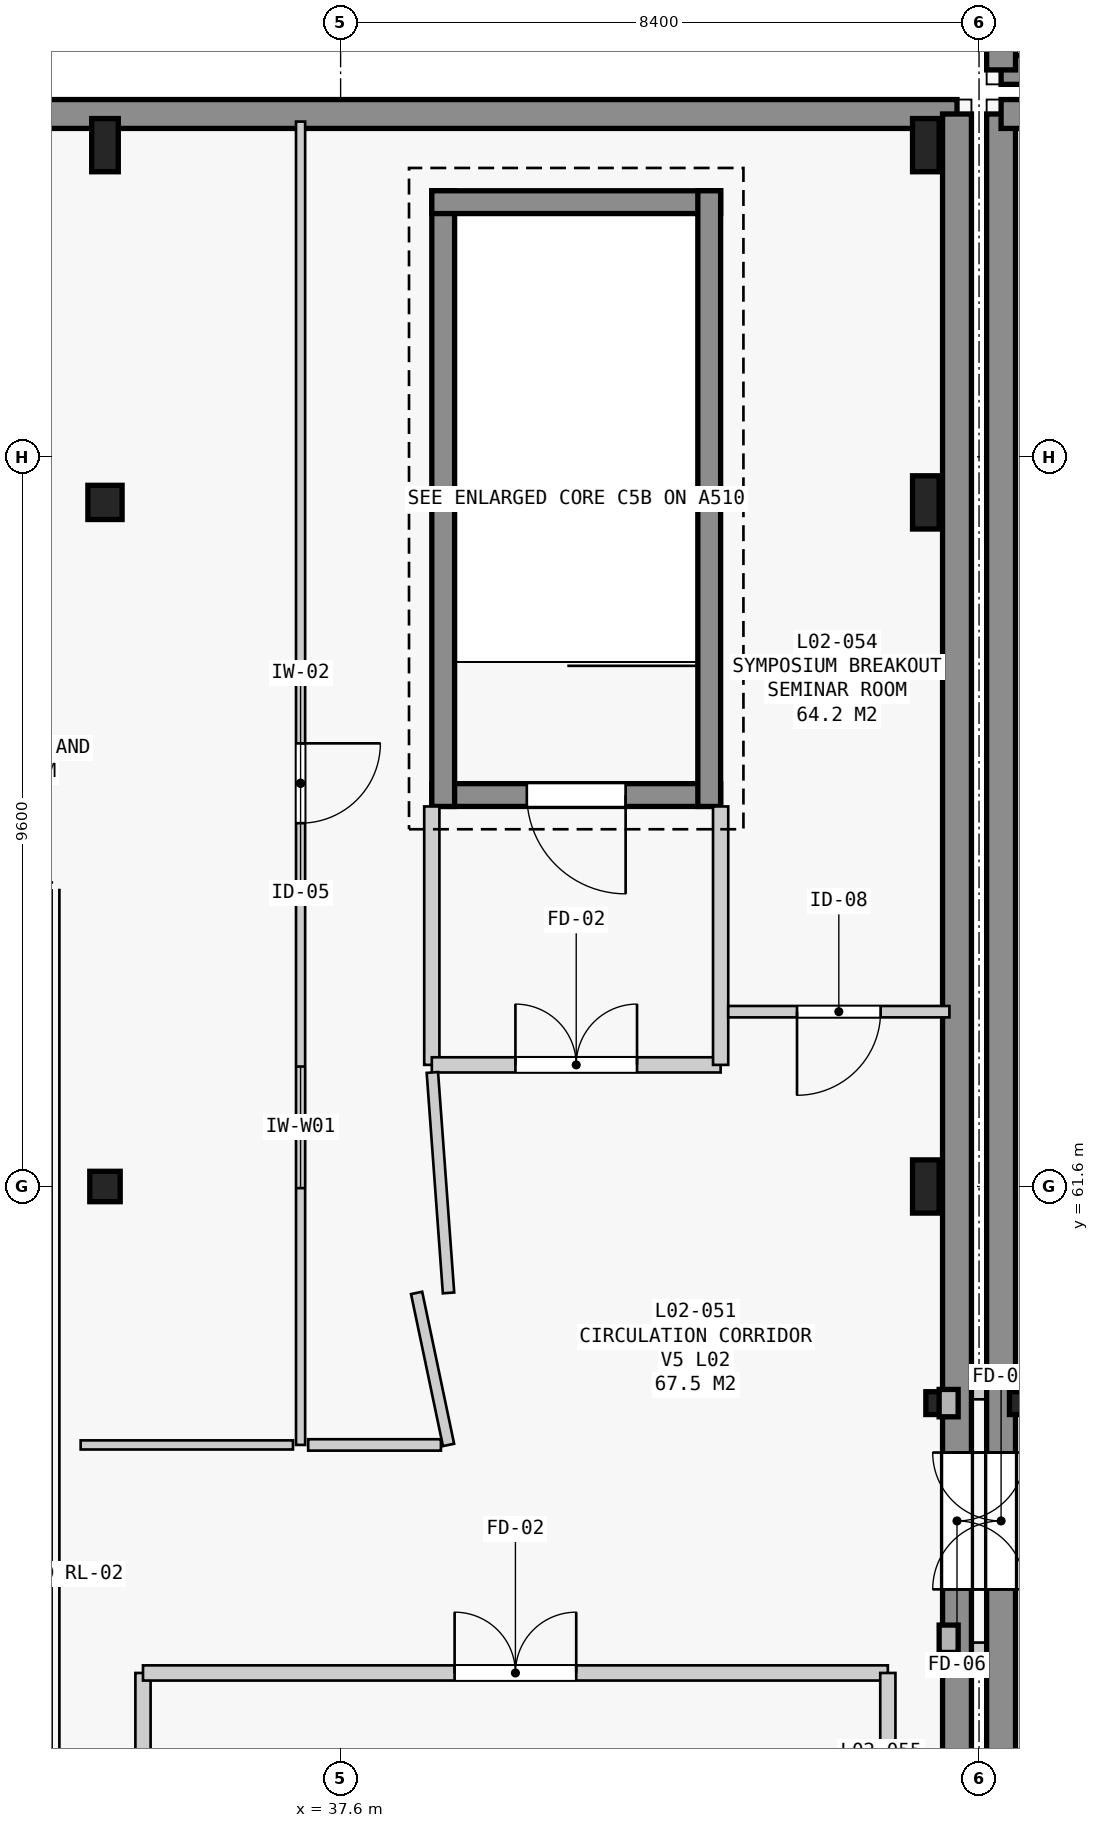
"""IFC4 building model, lengths in metres.
Left out: names, types, materials, properties, quantities, classifications, styles, units other than length and angle.
Written with IfcOpenShell. Run it as: python <this file> out.ifc"""

import sys

from ifc_helpers import new_model, si_unit, direction, frame, frame_2d, origin, origin_2d, place, context, subcontext, project, spatial, rectangle, i_section, extrude, element, fill, save


model = new_model("IFC4")
c1 = context("Model", 3, precision=1e-05, world=origin(), true_north=direction((0.0, 1.0)))
c2 = subcontext(c1, "Body", "Model", "MODEL_VIEW")
j1 = project(units=[si_unit("LENGTHUNIT", "METRE"), si_unit("PLANEANGLEUNIT", "RADIAN")], contexts=[c1])
p1 = place(None, origin())
s1 = spatial("IfcSite", under=j1, at=p1, CompositionType="ELEMENT")
p2 = place(p1, origin())
s2 = spatial("IfcBuilding", under=s1, at=p2, CompositionType="ELEMENT")
p3 = place(p2, frame((0.0, 0.0, 9.6)))
s3 = spatial("IfcBuildingStorey", under=s2, at=p3, CompositionType="ELEMENT", Elevation=9.6)
p4 = place(p3, frame((34.5, 61.6, 0.0), z_axis=(0.0, 0.0, 1.0), x_axis=(1.0, 0.0, 0.0)))
e1 = element("IfcColumn", 1, at=p4, inside=s3, PredefinedType="COLUMN", context=c2, shape_type="SweptSolid", body=[
    extrude(rectangle(XDim=0.4, YDim=0.4, at=origin_2d()), origin(), (0.0, 0.0, 1.0), 4.2),
])
p5 = place(p3, frame((34.5, 70.6, 0.0), z_axis=(0.0, 0.0, 1.0), x_axis=(1.0, 0.0, 0.0)))
e2 = element("IfcColumn", 2, at=p5, inside=s3, PredefinedType="COLUMN", context=c2, shape_type="SweptSolid", body=[
    extrude(rectangle(XDim=0.45, YDim=0.45, at=origin_2d()), origin(), (0.0, 0.0, 1.0), 4.2),
])
for number, where, z_axis, x_axis in (
    (3, (34.5, 75.3, 0.0), (0.0, 0.0, 1.0), (1.0, 0.0, 0.0)),
    (4, (45.3, 61.6, 0.0), (0.0, 0.0, 1.0), (1.0, 0.0, 0.0)),
    (5, (45.3, 70.6, 0.0), (0.0, 0.0, 1.0), (1.0, 0.0, 0.0)),
    (6, (45.3, 75.3, 0.0), (0.0, 0.0, 1.0), (1.0, 0.0, 0.0)),
):
    element("IfcColumn", number, at=place(p3, frame(where, z_axis=z_axis, x_axis=x_axis)), inside=s3, PredefinedType="COLUMN", context=c2, shape_type="SweptSolid", body=[
        extrude(rectangle(XDim=0.35, YDim=0.7, at=origin_2d()), origin(), (0.0, 0.0, 1.0), 4.2),
    ])
for number, where, z_axis, x_axis in (
    (7, (45.45, 58.75, 0.0), (0.0, 0.0, 1.0), (1.0, 0.0, 0.0)),
    (8, (46.55, 58.75, 0.0), (0.0, 0.0, 1.0), (1.0, 0.0, 0.0)),
):
    element("IfcColumn", number, at=place(p3, frame(where, z_axis=z_axis, x_axis=x_axis)), inside=s3, PredefinedType="COLUMN", context=c2, shape_type="SweptSolid", body=[
        extrude(i_section(OverallWidth=0.3, OverallDepth=0.3, WebThickness=0.011, FlangeThickness=0.019, FilletRadius=0.027, at=origin_2d()), origin(), (0.0, 0.0, 1.0), 3.785),
    ])
for number, where, z_axis, x_axis in (
    (9, (45.9, 55.5, 0.0), (0.0, 0.0, 1.0), (1.0, 0.0, 0.0)),
    (10, (45.9, 58.9, 0.0), (0.0, 0.0, 1.0), (1.0, 0.0, 0.0)),
):
    element("IfcWall", number, at=place(p3, frame(where, z_axis=z_axis, x_axis=x_axis)), inside=s3, PredefinedType="STANDARD", context=c2, shape_type="SweptSolid", body=[
        extrude(rectangle(XDim=0.2, YDim=0.2, at=frame_2d((0.1, 0.0))), origin(), (0.0, 0.0, 1.0), 3.94),
    ])
p6 = place(p3, frame((46.29, 42.69, 0.0), z_axis=(0.0, 0.0, 1.0), x_axis=(0.0, 1.0, 0.0)))
e11 = element("IfcWall", 11, at=p6, inside=s3, PredefinedType="STANDARD", context=c2, shape_type="SweptSolid", body=[
    extrude(rectangle(XDim=33.02, YDim=0.38, at=frame_2d((16.51, 0.0))), origin(), (0.0, 0.0, 1.0), 3.94),
])
p7 = place(p6, frame((13.61, 0.0, 0.0)))
e12 = element("IfcOpeningElement", 12, at=p7, cuts=e11, PredefinedType="OPENING", context=c2, shape_type="SweptSolid", body=[
    extrude(rectangle(XDim=1.8, YDim=2.2, at=frame_2d((0.9, 1.1))), frame((0.0, 0.2, 0.0), z_axis=(0.0, -1.0, 0.0), x_axis=(1.0, 0.0, 0.0)), (0.0, 0.0, 1.0), 0.4),
])
p8 = place(p3, frame((46.29, 75.71, 0.0), z_axis=(0.0, 0.0, 1.0), x_axis=(1.0, 0.0, 0.0)))
e13 = element("IfcWall", 13, at=p8, inside=s3, PredefinedType="STANDARD", context=c2, shape_type="SweptSolid", body=[
    extrude(rectangle(XDim=6.787, YDim=0.38, at=frame_2d((3.394, 0.0))), origin(), (0.0, 0.0, 1.0), 3.94),
])
p9 = place(p3, frame((53.077, 76.29, 0.0), z_axis=(0.0, 0.0, 1.0), x_axis=(-1.0, 0.0, 0.0)))
e14 = element("IfcWall", 14, at=p9, inside=s3, PredefinedType="STANDARD", context=c2, shape_type="SweptSolid", body=[
    extrude(rectangle(XDim=6.787, YDim=0.38, at=frame_2d((3.394, 0.0))), origin(), (0.0, 0.0, 1.0), 3.92),
])
p10 = place(p3, frame((46.29, 76.29, 0.0), z_axis=(0.0, 0.0, 1.0), x_axis=(0.0, 1.0, 0.0)))
e15 = element("IfcWall", 15, at=p10, inside=s3, PredefinedType="STANDARD", context=c2, shape_type="SweptSolid", body=[
    extrude(rectangle(XDim=37.52, YDim=0.38, at=frame_2d((18.76, 0.0))), origin(), (0.0, 0.0, 1.0), 3.92),
])
p11 = place(p10, frame((24.61, 0.0, 0.0)))
e16 = element("IfcOpeningElement", 16, at=p11, cuts=e15, PredefinedType="OPENING", context=c2, shape_type="SweptSolid", body=[
    extrude(rectangle(XDim=1.8, YDim=2.2, at=frame_2d((0.9, 1.1))), frame((0.0, 0.2, 0.0), z_axis=(0.0, -1.0, 0.0), x_axis=(1.0, 0.0, 0.0)), (0.0, 0.0, 1.0), 0.4),
])
p12 = place(p3, frame((19.99, 75.71, 0.0), z_axis=(0.0, 0.0, 1.0), x_axis=(1.0, 0.0, 0.0)))
e17 = element("IfcWall", 17, at=p12, inside=s3, PredefinedType="STANDARD", context=c2, shape_type="SweptSolid", body=[
    extrude(rectangle(XDim=25.72, YDim=0.38, at=frame_2d((12.86, 0.0))), origin(), (0.0, 0.0, 1.0), 3.94),
])
p13 = place(p12, frame((10.074, 0.0, 1.05)))
e18 = element("IfcOpeningElement", 18, at=p13, cuts=e17, PredefinedType="OPENING", context=c2, shape_type="SweptSolid", body=[
    extrude(rectangle(XDim=1.8, YDim=2.5, at=frame_2d((0.9, 1.25))), frame((0.0, 0.2, 0.0), z_axis=(0.0, -1.0, 0.0), x_axis=(1.0, 0.0, 0.0)), (0.0, 0.0, 1.0), 0.4),
])
p14 = place(p3, frame((45.71, 75.71, 0.0), z_axis=(0.0, 0.0, 1.0), x_axis=(0.0, -1.0, 0.0)))
e19 = element("IfcWall", 19, at=p14, inside=s3, PredefinedType="STANDARD", context=c2, shape_type="SweptSolid", body=[
    extrude(rectangle(XDim=33.02, YDim=0.38, at=frame_2d((16.51, 0.0))), origin(), (0.0, 0.0, 1.0), 3.94),
])
p15 = place(p14, frame((17.61, 0.0, 0.0)))
e20 = element("IfcOpeningElement", 20, at=p15, cuts=e19, PredefinedType="OPENING", context=c2, shape_type="SweptSolid", body=[
    extrude(rectangle(XDim=1.8, YDim=2.2, at=frame_2d((0.9, 1.1))), frame((0.0, 0.2, 0.0), z_axis=(0.0, -1.0, 0.0), x_axis=(1.0, 0.0, 0.0)), (0.0, 0.0, 1.0), 0.4),
])
p16 = place(p3, frame((35.0, 51.8, 0.0), z_axis=(0.0, 0.0, 1.0), x_axis=(0.0, 1.0, 0.0)))
e21 = element("IfcWall", 21, at=p16, inside=s3, PredefinedType="STANDARD", context=c2, shape_type="SweptSolid", body=[
    extrude(rectangle(XDim=3.4, YDim=0.2, at=frame_2d((1.7, 0.0))), origin(), (0.0, 0.0, 1.0), 4.2),
])
p17 = place(p3, frame((35.0, 55.2, 0.0), z_axis=(0.0, 0.0, 1.0), x_axis=(1.0, 0.0, 0.0)))
e22 = element("IfcWall", 22, at=p17, inside=s3, PredefinedType="STANDARD", context=c2, shape_type="SweptSolid", body=[
    extrude(rectangle(XDim=9.8, YDim=0.2, at=frame_2d((4.9, 0.0))), origin(), (0.0, 0.0, 1.0), 4.2),
])
p18 = place(p17, frame((4.1, 0.0, 0.0)))
e23 = element("IfcOpeningElement", 23, at=p18, cuts=e22, PredefinedType="OPENING", context=c2, shape_type="SweptSolid", body=[
    extrude(rectangle(XDim=1.6, YDim=2.2, at=frame_2d((0.8, 1.1))), frame((0.0, 0.11, 0.0), z_axis=(0.0, -1.0, 0.0), x_axis=(1.0, 0.0, 0.0)), (0.0, 0.0, 1.0), 0.22),
])
p19 = place(p3, frame((44.8, 55.2, 0.0), z_axis=(0.0, 0.0, 1.0), x_axis=(0.0, -1.0, 0.0)))
e24 = element("IfcWall", 24, at=p19, inside=s3, PredefinedType="STANDARD", context=c2, shape_type="SweptSolid", body=[
    extrude(rectangle(XDim=3.4, YDim=0.2, at=frame_2d((1.7, 0.0))), origin(), (0.0, 0.0, 1.0), 4.2),
])
p20 = place(p3, frame((42.6, 66.75, 0.0), z_axis=(0.0, 0.0, 1.0), x_axis=(-1.0, 0.0, 0.0)))
e25 = element("IfcWall", 25, at=p20, inside=s3, PredefinedType="SHEAR", context=c2, shape_type="SweptSolid", body=[
    extrude(rectangle(XDim=3.8, YDim=0.3, at=frame_2d((1.9, 0.0))), origin(), (0.0, 0.0, 1.0), 4.2),
])
p21 = place(p20, frame((1.25, 0.0, 0.0)))
e26 = element("IfcOpeningElement", 26, at=p21, cuts=e25, PredefinedType="OPENING", context=c2, shape_type="SweptSolid", body=[
    extrude(rectangle(XDim=1.3, YDim=2.2, at=frame_2d((0.65, 1.1))), frame((0.0, 0.16, 0.0), z_axis=(0.0, -1.0, 0.0), x_axis=(1.0, 0.0, 0.0)), (0.0, 0.0, 1.0), 0.32),
])
p22 = place(p3, frame((38.95, 66.6, 0.0), z_axis=(0.0, 0.0, 1.0), x_axis=(0.0, 1.0, 0.0)))
e27 = element("IfcWall", 27, at=p22, inside=s3, PredefinedType="SHEAR", context=c2, shape_type="SweptSolid", body=[
    extrude(rectangle(XDim=8.1, YDim=0.3, at=frame_2d((4.05, 0.0))), origin(), (0.0, 0.0, 1.0), 4.2),
])
p23 = place(p3, frame((38.8, 74.55, 0.0), z_axis=(0.0, 0.0, 1.0), x_axis=(1.0, 0.0, 0.0)))
e28 = element("IfcWall", 28, at=p23, inside=s3, PredefinedType="SHEAR", context=c2, shape_type="SweptSolid", body=[
    extrude(rectangle(XDim=3.8, YDim=0.3, at=frame_2d((1.9, 0.0))), origin(), (0.0, 0.0, 1.0), 4.2),
])
p24 = place(p3, frame((42.45, 74.7, 0.0), z_axis=(0.0, 0.0, 1.0), x_axis=(0.0, -1.0, 0.0)))
e29 = element("IfcWall", 29, at=p24, inside=s3, PredefinedType="SHEAR", context=c2, shape_type="SweptSolid", body=[
    extrude(rectangle(XDim=8.1, YDim=0.3, at=frame_2d((4.05, 0.0))), origin(), (0.0, 0.0, 1.0), 4.2),
])
p25 = place(p3, frame((38.8, 66.6, 0.0), z_axis=(0.0, 0.0, 1.0), x_axis=(0.0, -1.0, 0.0)))
e30 = element("IfcWall", 30, at=p25, inside=s3, PredefinedType="STANDARD", context=c2, shape_type="SweptSolid", body=[
    extrude(rectangle(XDim=3.4, YDim=0.2, at=frame_2d((1.7, 0.0))), origin(), (0.0, 0.0, 1.0), 4.2),
])
p26 = place(p3, frame((38.8, 63.2, 0.0), z_axis=(0.0, 0.0, 1.0), x_axis=(1.0, 0.0, 0.0)))
e31 = element("IfcWall", 31, at=p26, inside=s3, PredefinedType="STANDARD", context=c2, shape_type="SweptSolid", body=[
    extrude(rectangle(XDim=3.8, YDim=0.2, at=frame_2d((1.9, 0.0))), origin(), (0.0, 0.0, 1.0), 4.2),
])
p27 = place(p26, frame((1.1, 0.0, 0.0)))
e32 = element("IfcOpeningElement", 32, at=p27, cuts=e31, PredefinedType="OPENING", context=c2, shape_type="SweptSolid", body=[
    extrude(rectangle(XDim=1.6, YDim=2.2, at=frame_2d((0.8, 1.1))), frame((0.0, 0.11, 0.0), z_axis=(0.0, -1.0, 0.0), x_axis=(1.0, 0.0, 0.0)), (0.0, 0.0, 1.0), 0.22),
])
p28 = place(p3, frame((42.6, 63.2, 0.0), z_axis=(0.0, 0.0, 1.0), x_axis=(0.0, 1.0, 0.0)))
e33 = element("IfcWall", 33, at=p28, inside=s3, PredefinedType="STANDARD", context=c2, shape_type="SweptSolid", body=[
    extrude(rectangle(XDim=3.4, YDim=0.2, at=frame_2d((1.7, 0.0))), origin(), (0.0, 0.0, 1.0), 4.2),
])
p29 = place(p3, frame((37.073, 75.61, 0.0), z_axis=(0.0, 0.0, 1.0), x_axis=(0.0, -1.0, 0.0)))
e34 = element("IfcWall", 34, at=p29, inside=s3, PredefinedType="PARTITIONING", context=c2, shape_type="SweptSolid", body=[
    extrude(rectangle(XDim=17.41, YDim=0.12, at=frame_2d((8.705, 0.0))), origin(), (0.0, 0.0, 1.0), 3.17),
])
p30 = place(p29, frame((8.18, 0.0, 0.0)))
e35 = element("IfcOpeningElement", 35, at=p30, cuts=e34, PredefinedType="OPENING", context=c2, shape_type="SweptSolid", body=[
    extrude(rectangle(XDim=1.05, YDim=2.15, at=frame_2d((0.525, 1.075))), frame((0.0, 0.07, 0.0), z_axis=(0.0, -1.0, 0.0), x_axis=(1.0, 0.0, 0.0)), (0.0, 0.0, 1.0), 0.14),
])
p31 = place(p29, frame((12.432, 0.0, 1.05)))
e36 = element("IfcOpeningElement", 36, at=p31, cuts=e34, PredefinedType="OPENING", context=c2, shape_type="SweptSolid", body=[
    extrude(rectangle(XDim=1.6, YDim=1.5, at=frame_2d((0.8, 0.75))), frame((0.0, 0.07, 0.0), z_axis=(0.0, -1.0, 0.0), x_axis=(1.0, 0.0, 0.0)), (0.0, 0.0, 1.0), 0.14),
])
p32 = place(p3, frame((36.973, 58.2, 0.0), z_axis=(0.0, 0.0, 1.0), x_axis=(-1.0, 0.0, 0.0)))
e37 = element("IfcWall", 37, at=p32, inside=s3, PredefinedType="PARTITIONING", context=c2, shape_type="SweptSolid", body=[
    extrude(rectangle(XDim=2.793, YDim=0.12, at=frame_2d((1.397, 0.0))), origin(), (0.0, 0.0, 1.0), 3.94),
])
p33 = place(p3, frame((45.61, 63.9, 0.0), z_axis=(0.0, 0.0, 1.0), x_axis=(-1.0, 0.0, 0.0)))
e38 = element("IfcWall", 38, at=p33, inside=s3, PredefinedType="PARTITIONING", context=c2, shape_type="SweptSolid", body=[
    extrude(rectangle(XDim=2.91, YDim=0.15, at=frame_2d((1.455, 0.0))), origin(), (0.0, 0.0, 1.0), 3.27),
])
p34 = place(p33, frame((0.905, 0.0, 0.0)))
e39 = element("IfcOpeningElement", 39, at=p34, cuts=e38, PredefinedType="OPENING", context=c2, shape_type="SweptSolid", body=[
    extrude(rectangle(XDim=1.1, YDim=2.2, at=frame_2d((0.55, 1.1))), frame((0.0, 0.085, 0.0), z_axis=(0.0, -1.0, 0.0), x_axis=(1.0, 0.0, 0.0)), (0.0, 0.0, 1.0), 0.17),
])
p35 = place(p3, frame((38.807, 63.1, 0.0), z_axis=(0.0, 0.0, 1.0), x_axis=(0.073120239762, -0.997323132459, 0.0)))
e40 = element("IfcWall", 40, at=p35, inside=s3, PredefinedType="PARTITIONING", context=c2, shape_type="SweptSolid", body=[
    extrude(rectangle(XDim=2.908, YDim=0.15, at=frame_2d((1.454, 0.0))), origin(), (0.0, 0.0, 1.0), 3.17),
])
p36 = place(p3, frame((38.6, 60.2, 0.0), z_axis=(0.0, 0.0, 1.0), x_axis=(0.205480619879, -0.978661184912, 0.0)))
e41 = element("IfcWall", 41, at=p36, inside=s3, PredefinedType="PARTITIONING", context=c2, shape_type="SweptSolid", body=[
    extrude(rectangle(XDim=2.044, YDim=0.15, at=frame_2d((1.022, 0.0))), origin(), (0.0, 0.0, 1.0), 3.94),
])
p37 = place(p3, frame((38.92, 58.2, 0.0), z_axis=(0.0, 0.0, 1.0), x_axis=(-1.0, 0.0, 0.0)))
e42 = element("IfcWall", 42, at=p37, inside=s3, PredefinedType="PARTITIONING", context=c2, shape_type="SweptSolid", body=[
    extrude(rectangle(XDim=1.747, YDim=0.15, at=frame_2d((0.873, 0.0))), origin(), (0.0, 0.0, 1.0), 3.94),
])
p38 = place(p7, origin())
e43 = element("IfcDoor", 43, at=p38, inside=s3, OperationType="DOUBLE_DOOR_SINGLE_SWING", PredefinedType="DOOR", context=c2, shape_type="SweptSolid", body=[
    extrude(rectangle(XDim=1.8, YDim=2.2, at=frame_2d((0.9, 1.1))), frame((0.0, 0.025, 0.0), z_axis=(0.0, -1.0, 0.0), x_axis=(1.0, 0.0, 0.0)), (0.0, 0.0, 1.0), 0.05),
])
fill(e12, e43)
p39 = place(p15, origin())
e44 = element("IfcDoor", 44, at=p39, inside=s3, OperationType="DOUBLE_DOOR_SINGLE_SWING", PredefinedType="DOOR", context=c2, shape_type="SweptSolid", body=[
    extrude(rectangle(XDim=1.8, YDim=2.2, at=frame_2d((0.9, 1.1))), frame((0.0, 0.025, 0.0), z_axis=(0.0, -1.0, 0.0), x_axis=(1.0, 0.0, 0.0)), (0.0, 0.0, 1.0), 0.05),
])
fill(e20, e44)
p40 = place(p21, origin())
e45 = element("IfcDoor", 45, at=p40, inside=s3, OperationType="SINGLE_SWING_LEFT", PredefinedType="DOOR", context=c2, shape_type="SweptSolid", body=[
    extrude(rectangle(XDim=1.3, YDim=2.2, at=frame_2d((0.65, 1.1))), frame((0.0, 0.025, 0.0), z_axis=(0.0, -1.0, 0.0), x_axis=(1.0, 0.0, 0.0)), (0.0, 0.0, 1.0), 0.05),
])
fill(e26, e45)
p41 = place(p18, origin())
e46 = element("IfcDoor", 46, at=p41, inside=s3, OperationType="DOUBLE_DOOR_SINGLE_SWING", PredefinedType="DOOR", context=c2, shape_type="SweptSolid", body=[
    extrude(rectangle(XDim=1.6, YDim=2.2, at=frame_2d((0.8, 1.1))), frame((0.0, 0.025, 0.0), z_axis=(0.0, -1.0, 0.0), x_axis=(1.0, 0.0, 0.0)), (0.0, 0.0, 1.0), 0.05),
])
fill(e23, e46)
p42 = place(p27, origin())
e47 = element("IfcDoor", 47, at=p42, inside=s3, OperationType="DOUBLE_DOOR_SINGLE_SWING", PredefinedType="DOOR", context=c2, shape_type="SweptSolid", body=[
    extrude(rectangle(XDim=1.6, YDim=2.2, at=frame_2d((0.8, 1.1))), frame((0.0, 0.025, 0.0), z_axis=(0.0, -1.0, 0.0), x_axis=(1.0, 0.0, 0.0)), (0.0, 0.0, 1.0), 0.05),
])
fill(e32, e47)
p43 = place(p30, origin())
e48 = element("IfcDoor", 48, at=p43, inside=s3, OperationType="SINGLE_SWING_LEFT", PredefinedType="DOOR", context=c2, shape_type="SweptSolid", body=[
    extrude(rectangle(XDim=1.05, YDim=2.15, at=frame_2d((0.525, 1.075))), frame((0.0, 0.025, 0.0), z_axis=(0.0, -1.0, 0.0), x_axis=(1.0, 0.0, 0.0)), (0.0, 0.0, 1.0), 0.05),
])
fill(e35, e48)
p44 = place(p34, origin())
e49 = element("IfcDoor", 49, at=p44, inside=s3, OperationType="SINGLE_SWING_RIGHT", PredefinedType="DOOR", context=c2, shape_type="SweptSolid", body=[
    extrude(rectangle(XDim=1.1, YDim=2.2, at=frame_2d((0.55, 1.1))), frame((0.0, 0.025, 0.0), z_axis=(0.0, -1.0, 0.0), x_axis=(1.0, 0.0, 0.0)), (0.0, 0.0, 1.0), 0.05),
])
fill(e39, e49)
p45 = place(p31, origin())
e50 = element("IfcWindow", 50, at=p45, inside=s3, PartitioningType="SINGLE_PANEL", PredefinedType="WINDOW", context=c2, shape_type="SweptSolid", body=[
    extrude(rectangle(XDim=1.6, YDim=1.5, at=frame_2d((0.8, 0.75))), frame((0.0, 0.03, 0.0), z_axis=(0.0, -1.0, 0.0), x_axis=(1.0, 0.0, 0.0)), (0.0, 0.0, 1.0), 0.06),
])
fill(e36, e50)
save(model, sys.argv[1])
